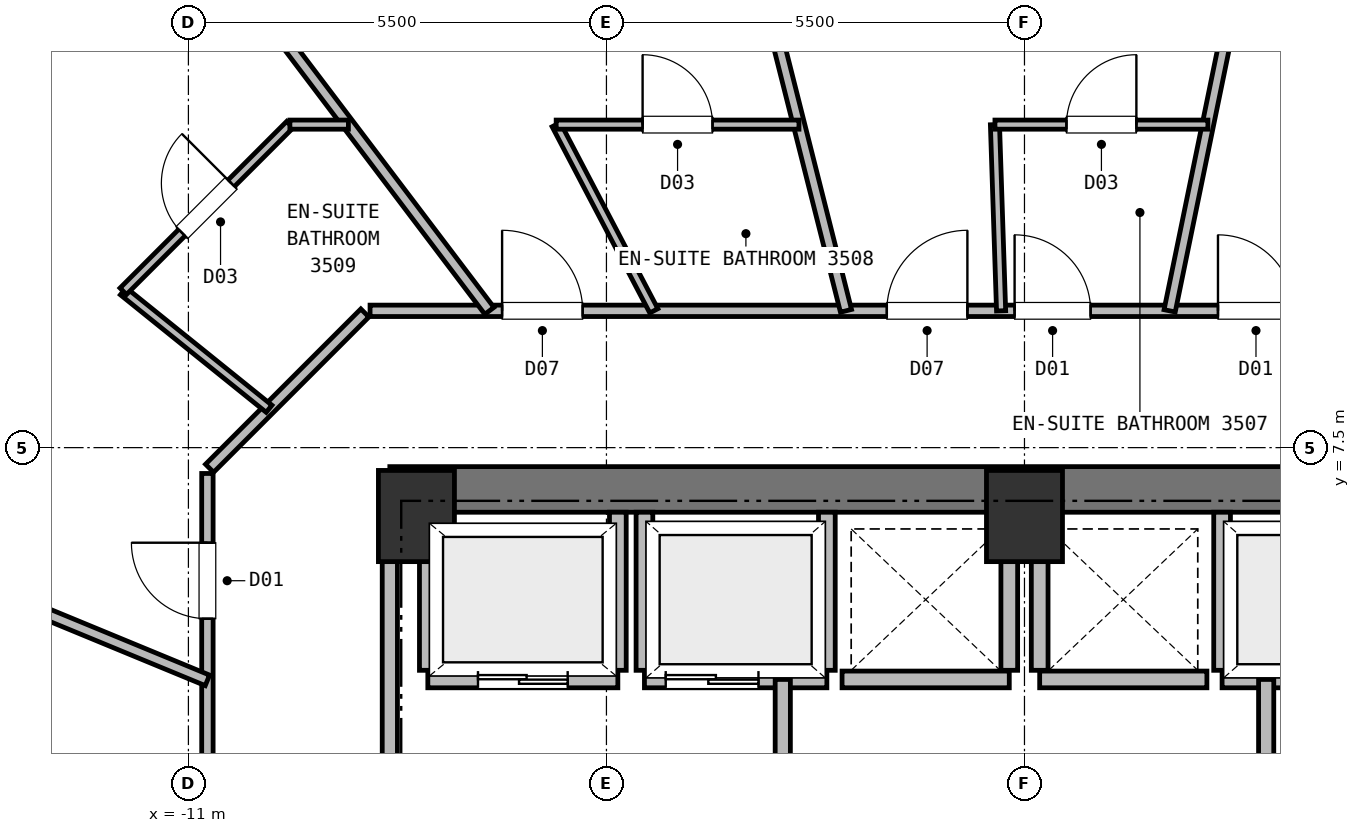
"""IFC4 building model, lengths in metres.
Left out: names, types, materials, properties, quantities, classifications, styles, units other than length and angle.
Written with IfcOpenShell. Run it as: python <this file> out.ifc"""

import sys

from ifc_helpers import new_model, si_unit, direction, frame, frame_2d, origin, origin_2d, place, context, subcontext, project, spatial, rectangle, extrude, element, fill, save


model = new_model("IFC4")
c1 = context("Model", 3, precision=1e-05, world=origin(), true_north=direction((0.0, 1.0)))
c2 = subcontext(c1, "Body", "Model", "MODEL_VIEW")
j1 = project(units=[si_unit("LENGTHUNIT", "METRE"), si_unit("PLANEANGLEUNIT", "RADIAN")], contexts=[c1])
p1 = place(None, origin())
s1 = spatial("IfcSite", under=j1, at=p1, CompositionType="ELEMENT")
p2 = place(p1, origin())
s2 = spatial("IfcBuilding", under=s1, at=p2, CompositionType="ELEMENT")
p3 = place(p2, frame((0.0, 0.0, 131.0)))
s3 = spatial("IfcBuildingStorey", under=s2, at=p3, CompositionType="ELEMENT", Elevation=131.0)
for number, where, z_axis, x_axis in (
    (1, (0.0, 6.6, 0.0), (0.0, 0.0, 1.0), (1.0, 0.0, 0.0)),
    (2, (-8.0, 6.6, 0.0), (0.0, 0.0, 1.0), (1.0, 0.0, 0.0)),
):
    element("IfcColumn", number, at=place(p3, frame(where, z_axis=z_axis, x_axis=x_axis)), inside=s3, PredefinedType="COLUMN", context=c2, shape_type="SweptSolid", body=[
        extrude(rectangle(XDim=1.0, YDim=1.2, at=origin_2d()), origin(), (0.0, 0.0, 1.0), 3.75),
    ])
p4 = place(p3, frame((-8.35, 6.95, 0.0), z_axis=(0.0, 0.0, 1.0), x_axis=(1.0, 0.0, 0.0)))
e3 = element("IfcWall", 3, at=p4, inside=s3, PredefinedType="SHEAR", context=c2, shape_type="SweptSolid", body=[
    extrude(rectangle(XDim=16.7, YDim=0.6, at=frame_2d((8.35, 0.0))), origin(), (0.0, 0.0, 1.0), 3.5),
])
p5 = place(p3, frame((-7.85, 4.45, 0.0), z_axis=(0.0, 0.0, 1.0), x_axis=(1.0, 0.0, 0.0)))
e4 = element("IfcWall", 4, at=p5, inside=s3, PredefinedType="PARTITIONING", context=c2, shape_type="SweptSolid", body=[
    extrude(rectangle(XDim=2.5, YDim=0.22, at=frame_2d((1.25, 0.0))), origin(), (0.0, 0.0, 1.0), 3.5),
])
p6 = place(p5, frame((0.66, 0.0, 0.0)))
e5 = element("IfcOpeningElement", 5, at=p6, cuts=e4, PredefinedType="OPENING", context=c2, shape_type="SweptSolid", body=[
    extrude(rectangle(XDim=1.18, YDim=2.15, at=frame_2d((0.59, 1.075))), frame((0.0, 0.12, 0.0), z_axis=(0.0, -1.0, 0.0), x_axis=(1.0, 0.0, 0.0)), (0.0, 0.0, 1.0), 0.24),
])
p7 = place(p3, frame((-7.85, 4.57, 0.0), z_axis=(0.0, 0.0, 1.0), x_axis=(0.0, 1.0, 0.0)))
e6 = element("IfcWall", 6, at=p7, inside=s3, PredefinedType="PARTITIONING", context=c2, shape_type="SweptSolid", body=[
    extrude(rectangle(XDim=2.08, YDim=0.22, at=frame_2d((1.04, 0.0))), origin(), (0.0, 0.0, 1.0), 3.12),
])
p8 = place(p3, frame((-5.35, 4.57, 0.0), z_axis=(0.0, 0.0, 1.0), x_axis=(0.0, 1.0, 0.0)))
e7 = element("IfcWall", 7, at=p8, inside=s3, PredefinedType="PARTITIONING", context=c2, shape_type="SweptSolid", body=[
    extrude(rectangle(XDim=2.08, YDim=0.22, at=frame_2d((1.04, 0.0))), origin(), (0.0, 0.0, 1.0), 3.5),
])
p9 = place(p3, frame((-5.0, 4.45, 0.0), z_axis=(0.0, 0.0, 1.0), x_axis=(1.0, 0.0, 0.0)))
e8 = element("IfcWall", 8, at=p9, inside=s3, PredefinedType="PARTITIONING", context=c2, shape_type="SweptSolid", body=[
    extrude(rectangle(XDim=2.4, YDim=0.22, at=frame_2d((1.2, 0.0))), origin(), (0.0, 0.0, 1.0), 3.5),
])
p10 = place(p9, frame((0.28, 0.0, 0.0)))
e9 = element("IfcOpeningElement", 9, at=p10, cuts=e8, PredefinedType="OPENING", context=c2, shape_type="SweptSolid", body=[
    extrude(rectangle(XDim=1.22, YDim=2.15, at=frame_2d((0.61, 1.075))), frame((0.0, 0.12, 0.0), z_axis=(0.0, -1.0, 0.0), x_axis=(1.0, 0.0, 0.0)), (0.0, 0.0, 1.0), 0.24),
])
for number, where, z_axis, x_axis in (
    (10, (-5.0, 4.57, 0.0), (0.0, 0.0, 1.0), (0.0, 1.0, 0.0)),
    (11, (-2.6, 4.57, 0.0), (0.0, 0.0, 1.0), (0.0, 1.0, 0.0)),
):
    element("IfcWall", number, at=place(p3, frame(where, z_axis=z_axis, x_axis=x_axis)), inside=s3, PredefinedType="PARTITIONING", context=c2, shape_type="SweptSolid", body=[
        extrude(rectangle(XDim=2.08, YDim=0.22, at=frame_2d((1.04, 0.0))), origin(), (0.0, 0.0, 1.0), 3.5),
    ])
p11 = place(p3, frame((2.6, 4.45, 0.0), z_axis=(0.0, 0.0, 1.0), x_axis=(1.0, 0.0, 0.0)))
e12 = element("IfcWall", 12, at=p11, inside=s3, PredefinedType="PARTITIONING", context=c2, shape_type="SweptSolid", body=[
    extrude(rectangle(XDim=2.4, YDim=0.22, at=frame_2d((1.2, 0.0))), origin(), (0.0, 0.0, 1.0), 3.5),
])
p12 = place(p11, frame((0.9, 0.0, 0.0)))
e13 = element("IfcOpeningElement", 13, at=p12, cuts=e12, PredefinedType="OPENING", context=c2, shape_type="SweptSolid", body=[
    extrude(rectangle(XDim=1.22, YDim=2.15, at=frame_2d((0.61, 1.075))), frame((0.0, 0.12, 0.0), z_axis=(0.0, -1.0, 0.0), x_axis=(1.0, 0.0, 0.0)), (0.0, 0.0, 1.0), 0.24),
])
p13 = place(p3, frame((2.6, 4.57, 0.0), z_axis=(0.0, 0.0, 1.0), x_axis=(0.0, 1.0, 0.0)))
e14 = element("IfcWall", 14, at=p13, inside=s3, PredefinedType="PARTITIONING", context=c2, shape_type="SweptSolid", body=[
    extrude(rectangle(XDim=2.08, YDim=0.22, at=frame_2d((1.04, 0.0))), origin(), (0.0, 0.0, 1.0), 3.5),
])
p14 = place(p3, frame((-2.4, 4.45, 0.0), z_axis=(0.0, 0.0, 1.0), x_axis=(1.0, 0.0, 0.0)))
e15 = element("IfcWall", 15, at=p14, inside=s3, PredefinedType="PARTITIONING", context=c2, shape_type="SweptSolid", body=[
    extrude(rectangle(XDim=2.2, YDim=0.22, at=frame_2d((1.1, 0.0))), origin(), (0.0, 0.0, 1.0), 3.5),
])
p15 = place(p3, frame((-0.2, 4.57, 0.0), z_axis=(0.0, 0.0, 1.0), x_axis=(0.0, 1.0, 0.0)))
e16 = element("IfcWall", 16, at=p15, inside=s3, PredefinedType="PARTITIONING", context=c2, shape_type="SweptSolid", body=[
    extrude(rectangle(XDim=2.08, YDim=0.22, at=frame_2d((1.04, 0.0))), origin(), (0.0, 0.0, 1.0), 3.5),
])
p16 = place(p3, frame((0.2, 4.45, 0.0), z_axis=(0.0, 0.0, 1.0), x_axis=(1.0, 0.0, 0.0)))
e17 = element("IfcWall", 17, at=p16, inside=s3, PredefinedType="PARTITIONING", context=c2, shape_type="SweptSolid", body=[
    extrude(rectangle(XDim=2.2, YDim=0.22, at=frame_2d((1.1, 0.0))), origin(), (0.0, 0.0, 1.0), 3.5),
])
p17 = place(p3, frame((0.2, 4.57, 0.0), z_axis=(0.0, 0.0, 1.0), x_axis=(0.0, 1.0, 0.0)))
e18 = element("IfcWall", 18, at=p17, inside=s3, PredefinedType="PARTITIONING", context=c2, shape_type="SweptSolid", body=[
    extrude(rectangle(XDim=2.08, YDim=0.22, at=frame_2d((1.04, 0.0))), origin(), (0.0, 0.0, 1.0), 3.5),
])
p18 = place(p3, frame((-3.18, 1.15, 0.0), z_axis=(0.0, 0.0, 1.0), x_axis=(0.0, 1.0, 0.0)))
e19 = element("IfcWall", 19, at=p18, inside=s3, PredefinedType="PARTITIONING", context=c2, shape_type="SweptSolid", body=[
    extrude(rectangle(XDim=3.3, YDim=0.2, at=frame_2d((1.65, 0.0))), origin(), (0.0, 0.0, 1.0), 3.5),
])
p19 = place(p18, frame((1.08, 0.0, 0.0)))
e20 = element("IfcOpeningElement", 20, at=p19, cuts=e19, PredefinedType="OPENING", context=c2, shape_type="SweptSolid", body=[
    extrude(rectangle(XDim=1.15, YDim=2.15, at=frame_2d((0.575, 1.075))), frame((0.0, 0.11, 0.0), z_axis=(0.0, -1.0, 0.0), x_axis=(1.0, 0.0, 0.0)), (0.0, 0.0, 1.0), 0.22),
])
p20 = place(p3, frame((3.18, 1.15, 0.0), z_axis=(0.0, 0.0, 1.0), x_axis=(0.0, 1.0, 0.0)))
e21 = element("IfcWall", 21, at=p20, inside=s3, PredefinedType="PARTITIONING", context=c2, shape_type="SweptSolid", body=[
    extrude(rectangle(XDim=3.3, YDim=0.2, at=frame_2d((1.65, 0.0))), origin(), (0.0, 0.0, 1.0), 3.5),
])
p21 = place(p20, frame((1.08, 0.0, 0.0)))
e22 = element("IfcOpeningElement", 22, at=p21, cuts=e21, PredefinedType="OPENING", context=c2, shape_type="SweptSolid", body=[
    extrude(rectangle(XDim=1.15, YDim=2.15, at=frame_2d((0.575, 1.075))), frame((0.0, 0.11, 0.0), z_axis=(0.0, -1.0, 0.0), x_axis=(1.0, 0.0, 0.0)), (0.0, 0.0, 1.0), 0.22),
])
p22 = place(p3, frame((-8.35, 1.15, 0.0), z_axis=(0.0, 0.0, 1.0), x_axis=(0.0, 1.0, 0.0)))
e23 = element("IfcWall", 23, at=p22, inside=s3, PredefinedType="PARTITIONING", context=c2, shape_type="SweptSolid", body=[
    extrude(rectangle(XDim=5.4, YDim=0.2, at=frame_2d((2.7, 0.0))), origin(), (0.0, 0.0, 1.0), 3.5),
])
p23 = place(p22, frame((0.95, 0.0, 0.0)))
e24 = element("IfcOpeningElement", 24, at=p23, cuts=e23, PredefinedType="OPENING", context=c2, shape_type="SweptSolid", body=[
    extrude(rectangle(XDim=1.15, YDim=2.15, at=frame_2d((0.575, 1.075))), frame((0.0, 0.11, 0.0), z_axis=(0.0, -1.0, 0.0), x_axis=(1.0, 0.0, 0.0)), (0.0, 0.0, 1.0), 0.22),
])
p24 = place(p3, frame((-8.61, 9.3, 0.0), z_axis=(0.0, 0.0, 1.0), x_axis=(1.0, 0.0, 0.0)))
e25 = element("IfcWall", 25, at=p24, inside=s3, PredefinedType="PARTITIONING", context=c2, shape_type="SweptSolid", body=[
    extrude(rectangle(XDim=17.22, YDim=0.15, at=frame_2d((8.61, 0.0))), origin(), (0.0, 0.0, 1.0), 3.5),
])
p25 = place(p24, frame((11.156, 0.0, 0.0)))
e26 = element("IfcOpeningElement", 26, at=p25, cuts=e25, PredefinedType="OPENING", context=c2, shape_type="SweptSolid", body=[
    extrude(rectangle(XDim=1.0, YDim=2.15, at=frame_2d((0.5, 1.075))), frame((0.0, 0.085, 0.0), z_axis=(0.0, -1.0, 0.0), x_axis=(1.0, 0.0, 0.0)), (0.0, 0.0, 1.0), 0.17),
])
p26 = place(p24, frame((6.799, 0.0, 0.0)))
e27 = element("IfcOpeningElement", 27, at=p26, cuts=e25, PredefinedType="OPENING", context=c2, shape_type="SweptSolid", body=[
    extrude(rectangle(XDim=1.06, YDim=2.15, at=frame_2d((0.53, 1.075))), frame((0.0, 0.085, 0.0), z_axis=(0.0, -1.0, 0.0), x_axis=(1.0, 0.0, 0.0)), (0.0, 0.0, 1.0), 0.17),
])
p27 = place(p24, frame((1.737, 0.0, 0.0)))
e28 = element("IfcOpeningElement", 28, at=p27, cuts=e25, PredefinedType="OPENING", context=c2, shape_type="SweptSolid", body=[
    extrude(rectangle(XDim=1.06, YDim=2.15, at=frame_2d((0.53, 1.075))), frame((0.0, 0.085, 0.0), z_axis=(0.0, -1.0, 0.0), x_axis=(1.0, 0.0, 0.0)), (0.0, 0.0, 1.0), 0.17),
])
p28 = place(p24, frame((8.48, 0.0, 0.0)))
e29 = element("IfcOpeningElement", 29, at=p28, cuts=e25, PredefinedType="OPENING", context=c2, shape_type="SweptSolid", body=[
    extrude(rectangle(XDim=1.0, YDim=2.15, at=frame_2d((0.5, 1.075))), frame((0.0, 0.085, 0.0), z_axis=(0.0, -1.0, 0.0), x_axis=(1.0, 0.0, 0.0)), (0.0, 0.0, 1.0), 0.17),
])
p29 = place(p3, frame((-10.722, 7.228, 0.0), z_axis=(0.0, 0.0, 1.0), x_axis=(0.707106781187, 0.707106781187, 0.0)))
e30 = element("IfcWall", 30, at=p29, inside=s3, PredefinedType="PARTITIONING", context=c2, shape_type="SweptSolid", body=[
    extrude(rectangle(XDim=2.89, YDim=0.15, at=frame_2d((1.445, 0.0))), origin(), (0.0, 0.0, 1.0), 3.5),
])
p30 = place(p3, frame((-10.75, -5.76, 0.0), z_axis=(0.0, 0.0, 1.0), x_axis=(0.0, 1.0, 0.0)))
e31 = element("IfcWall", 31, at=p30, inside=s3, PredefinedType="PARTITIONING", context=c2, shape_type="SweptSolid", body=[
    extrude(rectangle(XDim=12.92, YDim=0.15, at=frame_2d((6.46, 0.0))), origin(), (0.0, 0.0, 1.0), 3.5),
])
p31 = place(p30, frame((1.28, 0.0, 0.0)))
e32 = element("IfcOpeningElement", 32, at=p31, cuts=e31, PredefinedType="OPENING", context=c2, shape_type="SweptSolid", body=[
    extrude(rectangle(XDim=0.95, YDim=2.1, at=frame_2d((0.475, 1.05))), frame((0.0, 0.085, 0.0), z_axis=(0.0, -1.0, 0.0), x_axis=(1.0, 0.0, 0.0)), (0.0, 0.0, 1.0), 0.17),
])
p32 = place(p30, frame((5.956, 0.0, 0.0)))
e33 = element("IfcOpeningElement", 33, at=p32, cuts=e31, PredefinedType="OPENING", context=c2, shape_type="SweptSolid", body=[
    extrude(rectangle(XDim=1.0, YDim=2.15, at=frame_2d((0.5, 1.075))), frame((0.0, 0.085, 0.0), z_axis=(0.0, -1.0, 0.0), x_axis=(1.0, 0.0, 0.0)), (0.0, 0.0, 1.0), 0.17),
])
p33 = place(p30, frame((11.009, 0.0, 0.0)))
e34 = element("IfcOpeningElement", 34, at=p33, cuts=e31, PredefinedType="OPENING", context=c2, shape_type="SweptSolid", body=[
    extrude(rectangle(XDim=1.0, YDim=2.15, at=frame_2d((0.5, 1.075))), frame((0.0, 0.085, 0.0), z_axis=(0.0, -1.0, 0.0), x_axis=(1.0, 0.0, 0.0)), (0.0, 0.0, 1.0), 0.17),
])
p34 = place(p3, frame((1.91, 9.3, 0.0), z_axis=(0.0, 0.0, 1.0), x_axis=(0.201190538841, 0.97955212576, 0.0)))
e35 = element("IfcWall", 35, at=p34, inside=s3, PredefinedType="PARTITIONING", context=c2, shape_type="SweptSolid", body=[
    extrude(rectangle(XDim=7.777, YDim=0.15, at=frame_2d((3.889, 0.0))), origin(), (0.0, 0.0, 1.0), 3.5),
])
p35 = place(p3, frame((-0.308, 9.3, 0.0), z_axis=(0.0, 0.0, 1.0), x_axis=(-0.032966625408, 0.999456453083, 0.0)))
e36 = element("IfcWall", 36, at=p35, inside=s3, PredefinedType="PARTITIONING", context=c2, shape_type="SweptSolid", body=[
    extrude(rectangle(XDim=2.451, YDim=0.12, at=frame_2d((1.226, 0.0))), origin(), (0.0, 0.0, 1.0), 3.5),
])
p36 = place(p3, frame((-0.388, 11.75, 0.0), z_axis=(0.0, 0.0, 1.0), x_axis=(1.0, 0.0, 0.0)))
e37 = element("IfcWall", 37, at=p36, inside=s3, PredefinedType="PARTITIONING", context=c2, shape_type="SweptSolid", body=[
    extrude(rectangle(XDim=2.802, YDim=0.12, at=frame_2d((1.401, 0.0))), origin(), (0.0, 0.0, 1.0), 3.5),
])
p37 = place(p36, frame((0.941, 0.0, 0.0)))
e38 = element("IfcOpeningElement", 38, at=p37, cuts=e37, PredefinedType="OPENING", context=c2, shape_type="SweptSolid", body=[
    extrude(rectangle(XDim=0.92, YDim=2.1, at=frame_2d((0.46, 1.05))), frame((0.0, 0.07, 0.0), z_axis=(0.0, -1.0, 0.0), x_axis=(1.0, 0.0, 0.0)), (0.0, 0.0, 1.0), 0.14),
])
p38 = place(p3, frame((-2.348, 9.3, 0.0), z_axis=(0.0, 0.0, 1.0), x_axis=(-0.244821157428, 0.969568254882, 0.0)))
e39 = element("IfcWall", 39, at=p38, inside=s3, PredefinedType="PARTITIONING", context=c2, shape_type="SweptSolid", body=[
    extrude(rectangle(XDim=10.855, YDim=0.15, at=frame_2d((5.427, 0.0))), origin(), (0.0, 0.0, 1.0), 3.5),
])
p39 = place(p3, frame((-6.161, 11.75, 0.0), z_axis=(0.0, 0.0, 1.0), x_axis=(0.464392787292, -0.885629346347, 0.0)))
e40 = element("IfcWall", 40, at=p39, inside=s3, PredefinedType="PARTITIONING", context=c2, shape_type="SweptSolid", body=[
    extrude(rectangle(XDim=2.766, YDim=0.12, at=frame_2d((1.383, 0.0))), origin(), (0.0, 0.0, 1.0), 3.5),
])
p40 = place(p3, frame((-6.161, 11.75, 0.0), z_axis=(0.0, 0.0, 1.0), x_axis=(1.0, 0.0, 0.0)))
e41 = element("IfcWall", 41, at=p40, inside=s3, PredefinedType="PARTITIONING", context=c2, shape_type="SweptSolid", body=[
    extrude(rectangle(XDim=3.194, YDim=0.12, at=frame_2d((1.597, 0.0))), origin(), (0.0, 0.0, 1.0), 3.5),
])
p41 = place(p40, frame((1.137, 0.0, 0.0)))
e42 = element("IfcOpeningElement", 42, at=p41, cuts=e41, PredefinedType="OPENING", context=c2, shape_type="SweptSolid", body=[
    extrude(rectangle(XDim=0.92, YDim=2.1, at=frame_2d((0.46, 1.05))), frame((0.0, 0.07, 0.0), z_axis=(0.0, -1.0, 0.0), x_axis=(1.0, 0.0, 0.0)), (0.0, 0.0, 1.0), 0.14),
])
p42 = place(p3, frame((-7.04, 9.3, 0.0), z_axis=(0.0, 0.0, 1.0), x_axis=(-0.603569047372, 0.797310733061, 0.0)))
e43 = element("IfcWall", 43, at=p42, inside=s3, PredefinedType="PARTITIONING", context=c2, shape_type="SweptSolid", body=[
    extrude(rectangle(XDim=12.15, YDim=0.15, at=frame_2d((6.075, 0.0))), origin(), (0.0, 0.0, 1.0), 3.5),
])
p43 = place(p3, frame((-11.857, 9.558, 0.0), z_axis=(0.0, 0.0, 1.0), x_axis=(0.778601964437, -0.627518112069, 0.0)))
e44 = element("IfcWall", 44, at=p43, inside=s3, PredefinedType="PARTITIONING", context=c2, shape_type="SweptSolid", body=[
    extrude(rectangle(XDim=2.464, YDim=0.12, at=frame_2d((1.232, 0.0))), origin(), (0.0, 0.0, 1.0), 3.5),
])
p44 = place(p3, frame((-11.857, 9.558, 0.0), z_axis=(0.0, 0.0, 1.0), x_axis=(0.7071461491, 0.707067411081, 0.0)))
e45 = element("IfcWall", 45, at=p44, inside=s3, PredefinedType="PARTITIONING", context=c2, shape_type="SweptSolid", body=[
    extrude(rectangle(XDim=3.101, YDim=0.12, at=frame_2d((1.55, 0.0))), origin(), (0.0, 0.0, 1.0), 3.5),
])
p45 = place(p44, frame((1.09, 0.0, 0.0)))
e46 = element("IfcOpeningElement", 46, at=p45, cuts=e45, PredefinedType="OPENING", context=c2, shape_type="SweptSolid", body=[
    extrude(rectangle(XDim=0.92, YDim=2.1, at=frame_2d((0.46, 1.05))), frame((0.0, 0.07, 0.0), z_axis=(0.0, -1.0, 0.0), x_axis=(1.0, 0.0, 0.0)), (0.0, 0.0, 1.0), 0.14),
])
p46 = place(p3, frame((-8.895, 11.75, 0.0), z_axis=(0.0, 0.0, 1.0), x_axis=(-1.0, 0.0, 0.0)))
e47 = element("IfcWall", 47, at=p46, inside=s3, PredefinedType="PARTITIONING", context=c2, shape_type="SweptSolid", body=[
    extrude(rectangle(XDim=0.77, YDim=0.12, at=frame_2d((0.385, 0.0))), origin(), (0.0, 0.0, 1.0), 3.5),
])
p47 = place(p3, frame((-10.75, 4.438, 0.0), z_axis=(0.0, 0.0, 1.0), x_axis=(-0.924334473985, 0.381583254615, 0.0)))
e48 = element("IfcWall", 48, at=p47, inside=s3, PredefinedType="PARTITIONING", context=c2, shape_type="SweptSolid", body=[
    extrude(rectangle(XDim=6.408, YDim=0.15, at=frame_2d((3.204, 0.0))), origin(), (0.0, 0.0, 1.0), 3.5),
])
p48 = place(p6, origin())
e49 = element("IfcDoor", 49, at=p48, inside=s3, OperationType="DOUBLE_DOOR_SLIDING", PredefinedType="DOOR", context=c2, shape_type="SweptSolid", body=[
    extrude(rectangle(XDim=1.18, YDim=2.15, at=frame_2d((0.59, 1.075))), frame((0.0, 0.025, 0.0), z_axis=(0.0, -1.0, 0.0), x_axis=(1.0, 0.0, 0.0)), (0.0, 0.0, 1.0), 0.05),
])
fill(e5, e49)
p49 = place(p10, origin())
e50 = element("IfcDoor", 50, at=p49, inside=s3, OperationType="DOUBLE_DOOR_SLIDING", PredefinedType="DOOR", context=c2, shape_type="SweptSolid", body=[
    extrude(rectangle(XDim=1.22, YDim=2.15, at=frame_2d((0.61, 1.075))), frame((0.0, 0.025, 0.0), z_axis=(0.0, -1.0, 0.0), x_axis=(1.0, 0.0, 0.0)), (0.0, 0.0, 1.0), 0.05),
])
fill(e9, e50)
p50 = place(p37, origin())
e51 = element("IfcDoor", 51, at=p50, inside=s3, OperationType="SINGLE_SWING_RIGHT", PredefinedType="DOOR", context=c2, shape_type="SweptSolid", body=[
    extrude(rectangle(XDim=0.92, YDim=2.1, at=frame_2d((0.46, 1.05))), frame((0.0, 0.025, 0.0), z_axis=(0.0, -1.0, 0.0), x_axis=(1.0, 0.0, 0.0)), (0.0, 0.0, 1.0), 0.05),
])
fill(e38, e51)
p51 = place(p41, origin())
e52 = element("IfcDoor", 52, at=p51, inside=s3, OperationType="SINGLE_SWING_LEFT", PredefinedType="DOOR", context=c2, shape_type="SweptSolid", body=[
    extrude(rectangle(XDim=0.92, YDim=2.1, at=frame_2d((0.46, 1.05))), frame((0.0, 0.025, 0.0), z_axis=(0.0, -1.0, 0.0), x_axis=(1.0, 0.0, 0.0)), (0.0, 0.0, 1.0), 0.05),
])
fill(e42, e52)
p52 = place(p45, origin())
e53 = element("IfcDoor", 53, at=p52, inside=s3, OperationType="SINGLE_SWING_RIGHT", PredefinedType="DOOR", context=c2, shape_type="SweptSolid", body=[
    extrude(rectangle(XDim=0.92, YDim=2.1, at=frame_2d((0.46, 1.05))), frame((0.0, 0.025, 0.0), z_axis=(0.0, -1.0, 0.0), x_axis=(1.0, 0.0, 0.0)), (0.0, 0.0, 1.0), 0.05),
])
fill(e46, e53)
p53 = place(p25, origin())
e54 = element("IfcDoor", 54, at=p53, inside=s3, OperationType="SINGLE_SWING_LEFT", PredefinedType="DOOR", context=c2, shape_type="SweptSolid", body=[
    extrude(rectangle(XDim=1.0, YDim=2.15, at=frame_2d((0.5, 1.075))), frame((0.0, 0.025, 0.0), z_axis=(0.0, -1.0, 0.0), x_axis=(1.0, 0.0, 0.0)), (0.0, 0.0, 1.0), 0.05),
])
fill(e26, e54)
p54 = place(p26, origin())
e55 = element("IfcDoor", 55, at=p54, inside=s3, OperationType="SINGLE_SWING_RIGHT", PredefinedType="DOOR", context=c2, shape_type="SweptSolid", body=[
    extrude(rectangle(XDim=1.06, YDim=2.15, at=frame_2d((0.53, 1.075))), frame((0.0, 0.025, 0.0), z_axis=(0.0, -1.0, 0.0), x_axis=(1.0, 0.0, 0.0)), (0.0, 0.0, 1.0), 0.05),
])
fill(e27, e55)
p55 = place(p33, origin())
e56 = element("IfcDoor", 56, at=p55, inside=s3, OperationType="SINGLE_SWING_RIGHT", PredefinedType="DOOR", context=c2, shape_type="SweptSolid", body=[
    extrude(rectangle(XDim=1.0, YDim=2.15, at=frame_2d((0.5, 1.075))), frame((0.0, 0.025, 0.0), z_axis=(0.0, -1.0, 0.0), x_axis=(1.0, 0.0, 0.0)), (0.0, 0.0, 1.0), 0.05),
])
fill(e34, e56)
p56 = place(p27, origin())
e57 = element("IfcDoor", 57, at=p56, inside=s3, OperationType="SINGLE_SWING_LEFT", PredefinedType="DOOR", context=c2, shape_type="SweptSolid", body=[
    extrude(rectangle(XDim=1.06, YDim=2.15, at=frame_2d((0.53, 1.075))), frame((0.0, 0.025, 0.0), z_axis=(0.0, -1.0, 0.0), x_axis=(1.0, 0.0, 0.0)), (0.0, 0.0, 1.0), 0.05),
])
fill(e28, e57)
p57 = place(p28, origin())
e58 = element("IfcDoor", 58, at=p57, inside=s3, OperationType="SINGLE_SWING_LEFT", PredefinedType="DOOR", context=c2, shape_type="SweptSolid", body=[
    extrude(rectangle(XDim=1.0, YDim=2.15, at=frame_2d((0.5, 1.075))), frame((0.0, 0.025, 0.0), z_axis=(0.0, -1.0, 0.0), x_axis=(1.0, 0.0, 0.0)), (0.0, 0.0, 1.0), 0.05),
])
fill(e29, e58)
save(model, sys.argv[1])
